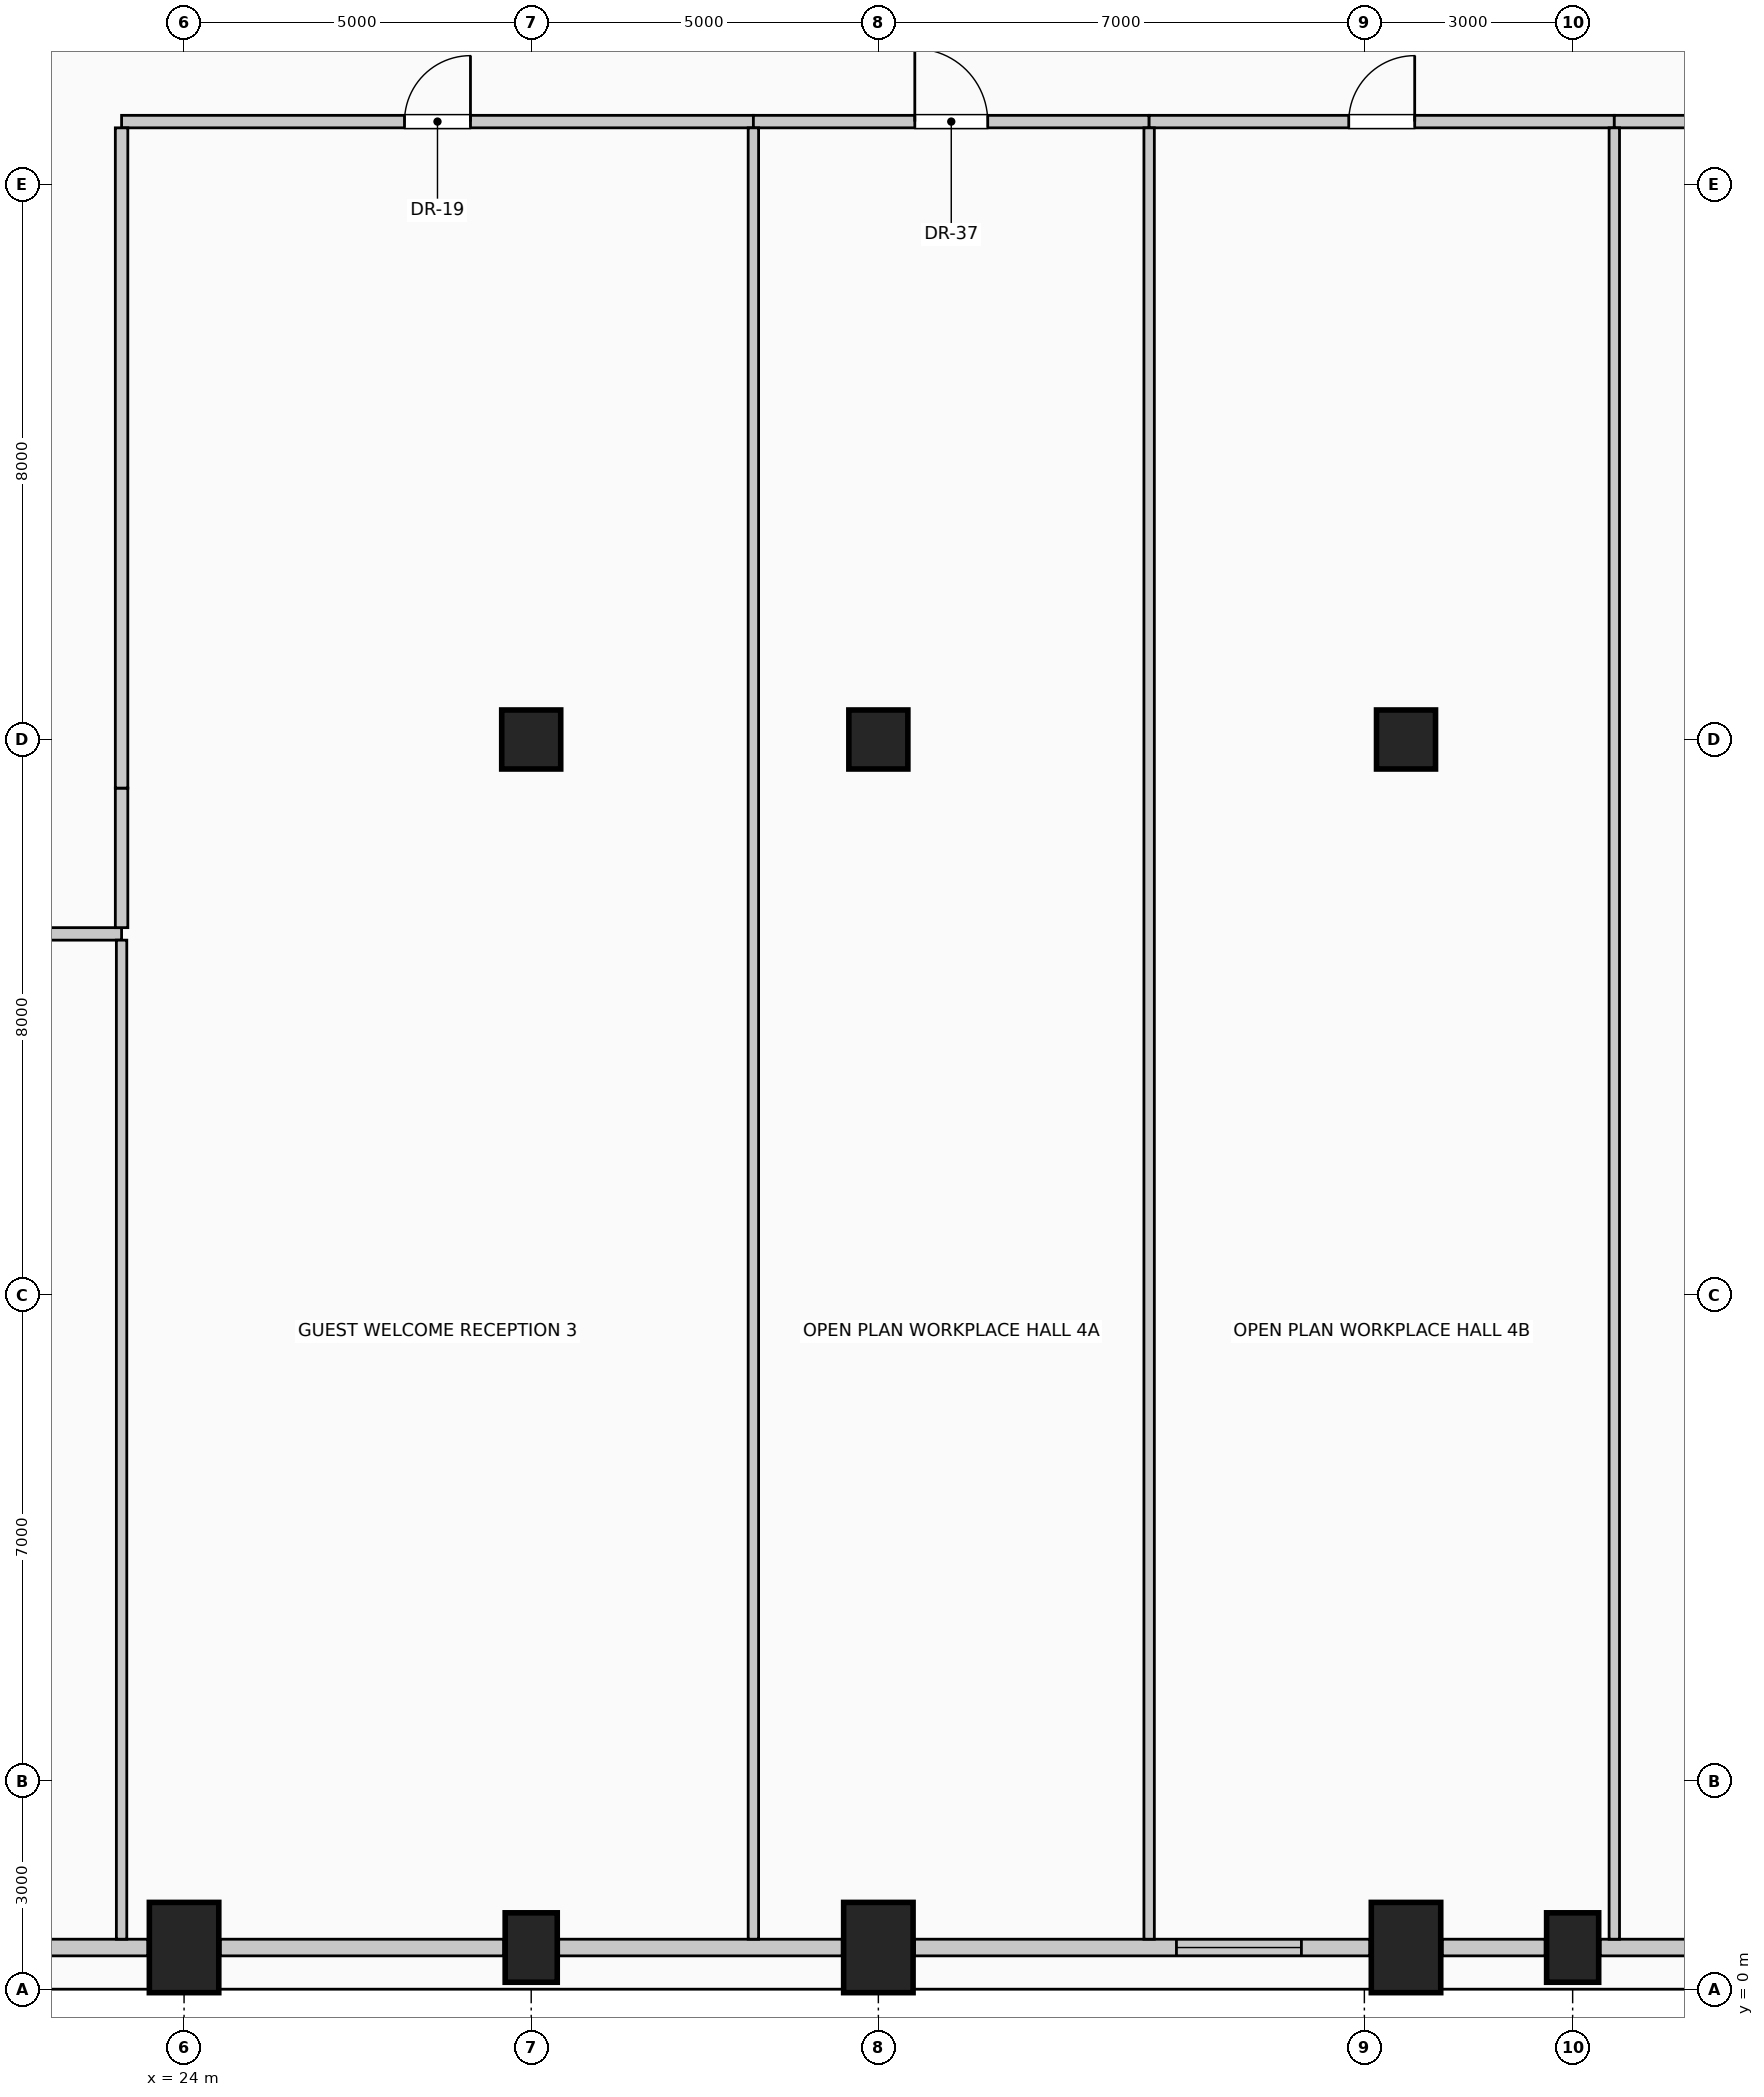
"""IFC4 building model, lengths in metres.
Left out: names, types, materials, properties, quantities, classifications, styles, units other than length and angle.
Written with IfcOpenShell. Run it as: python <this file> out.ifc"""

import sys

from ifc_helpers import new_model, si_unit, direction, frame, frame_2d, origin, origin_2d, place, context, subcontext, project, spatial, rectangle, circle, extrude, element, fill, save


model = new_model("IFC4")
c1 = context("Model", 3, precision=1e-05, world=origin(), true_north=direction((0.0, 1.0)))
c2 = subcontext(c1, "Body", "Model", "MODEL_VIEW")
j1 = project(units=[si_unit("LENGTHUNIT", "METRE"), si_unit("PLANEANGLEUNIT", "RADIAN")], contexts=[c1])
p1 = place(None, origin())
s1 = spatial("IfcSite", under=j1, at=p1, CompositionType="ELEMENT")
p2 = place(p1, origin())
s2 = spatial("IfcBuilding", under=s1, at=p2, CompositionType="ELEMENT")
p3 = place(p2, frame((0.0, 0.0, 230.6)))
s3 = spatial("IfcBuildingStorey", under=s2, at=p3, CompositionType="ELEMENT", Elevation=230.6)
p4 = place(p3, frame((24.0, 0.6, 0.0), z_axis=(0.0, 0.0, 1.0), x_axis=(1.0, 0.0, 0.0)))
e1 = element("IfcColumn", 1, at=p4, inside=s3, PredefinedType="COLUMN", context=c2, shape_type="SweptSolid", body=[
    extrude(rectangle(XDim=1.0, YDim=1.3, at=origin_2d()), origin(), (0.0, 0.0, 1.0), 4.0),
])
p5 = place(p3, frame((29.0, 0.6, 0.0), z_axis=(0.0, 0.0, 1.0), x_axis=(1.0, 0.0, 0.0)))
e2 = element("IfcColumn", 2, at=p5, inside=s3, PredefinedType="COLUMN", context=c2, shape_type="SweptSolid", body=[
    extrude(rectangle(XDim=0.75, YDim=1.0, at=origin_2d()), origin(), (0.0, 0.0, 1.0), 4.0),
])
for number, where, z_axis, x_axis in (
    (3, (34.0, 0.6, 0.0), (0.0, 0.0, 1.0), (1.0, 0.0, 0.0)),
    (4, (41.6, 0.6, 0.0), (0.0, 0.0, 1.0), (1.0, 0.0, 0.0)),
):
    element("IfcColumn", number, at=place(p3, frame(where, z_axis=z_axis, x_axis=x_axis)), inside=s3, PredefinedType="COLUMN", context=c2, shape_type="SweptSolid", body=[
        extrude(rectangle(XDim=1.0, YDim=1.3, at=origin_2d()), origin(), (0.0, 0.0, 1.0), 4.0),
    ])
p6 = place(p3, frame((44.0, 0.6, 0.0), z_axis=(0.0, 0.0, 1.0), x_axis=(1.0, 0.0, 0.0)))
e5 = element("IfcColumn", 5, at=p6, inside=s3, PredefinedType="COLUMN", context=c2, shape_type="SweptSolid", body=[
    extrude(rectangle(XDim=0.75, YDim=1.0, at=origin_2d()), origin(), (0.0, 0.0, 1.0), 4.0),
])
for number, where, z_axis, x_axis in (
    (6, (29.0, 18.0, 0.0), (0.0, 0.0, 1.0), (1.0, 0.0, 0.0)),
    (7, (41.6, 18.0, 0.0), (0.0, 0.0, 1.0), (1.0, 0.0, 0.0)),
    (8, (34.0, 18.0, 0.0), (0.0, 0.0, 1.0), (1.0, 0.0, 0.0)),
):
    element("IfcColumn", number, at=place(p3, frame(where, z_axis=z_axis, x_axis=x_axis)), inside=s3, PredefinedType="COLUMN", context=c2, shape_type="SweptSolid", body=[
        extrude(circle(Radius=0.425, at=origin_2d()), origin(), (0.0, 0.0, 1.0), 4.0),
    ])
p7 = place(p3, frame((23.48, 0.6, 0.0), z_axis=(0.0, 0.0, 1.0), x_axis=(-1.0, 0.0, 0.0)))
e9 = element("IfcWall", 9, at=p7, inside=s3, PredefinedType="SOLIDWALL", context=c2, shape_type="SweptSolid", body=[
    extrude(rectangle(XDim=6.56, YDim=0.24, at=frame_2d((3.28, 0.0))), origin(), (0.0, 0.0, 1.0), 3.0),
])
p8 = place(p7, frame((3.773, 0.0, 0.42)))
e10 = element("IfcOpeningElement", 10, at=p8, cuts=e9, PredefinedType="OPENING", context=c2, shape_type="SweptSolid", body=[
    extrude(rectangle(XDim=1.8, YDim=2.2, at=frame_2d((0.9, 1.1))), frame((0.0, 0.13, 0.0), z_axis=(0.0, -1.0, 0.0), x_axis=(1.0, 0.0, 0.0)), (0.0, 0.0, 1.0), 0.26),
])
for number, where, z_axis, x_axis in (
    (11, (28.605, 0.6, 0.0), (0.0, 0.0, 1.0), (-1.0, 0.0, 0.0)),
    (12, (33.48, 0.6, 0.0), (0.0, 0.0, 1.0), (-1.0, 0.0, 0.0)),
):
    element("IfcWall", number, at=place(p3, frame(where, z_axis=z_axis, x_axis=x_axis)), inside=s3, PredefinedType="SOLIDWALL", context=c2, shape_type="SweptSolid", body=[
        extrude(rectangle(XDim=4.085, YDim=0.24, at=frame_2d((2.042, 0.0))), origin(), (0.0, 0.0, 1.0), 3.0),
    ])
p9 = place(p3, frame((41.08, 0.6, 0.0), z_axis=(0.0, 0.0, 1.0), x_axis=(-1.0, 0.0, 0.0)))
e13 = element("IfcWall", 13, at=p9, inside=s3, PredefinedType="SOLIDWALL", context=c2, shape_type="SweptSolid", body=[
    extrude(rectangle(XDim=6.56, YDim=0.24, at=frame_2d((3.28, 0.0))), origin(), (0.0, 0.0, 1.0), 3.0),
])
p10 = place(p9, frame((0.987, 0.0, 0.42)))
e14 = element("IfcOpeningElement", 14, at=p10, cuts=e13, PredefinedType="OPENING", context=c2, shape_type="SweptSolid", body=[
    extrude(rectangle(XDim=1.8, YDim=2.2, at=frame_2d((0.9, 1.1))), frame((0.0, 0.13, 0.0), z_axis=(0.0, -1.0, 0.0), x_axis=(1.0, 0.0, 0.0)), (0.0, 0.0, 1.0), 0.26),
])
p11 = place(p3, frame((43.605, 0.6, 0.0), z_axis=(0.0, 0.0, 1.0), x_axis=(-1.0, 0.0, 0.0)))
e15 = element("IfcWall", 15, at=p11, inside=s3, PredefinedType="SOLIDWALL", context=c2, shape_type="SweptSolid", body=[
    extrude(rectangle(XDim=1.485, YDim=0.24, at=frame_2d((0.742, 0.0))), origin(), (0.0, 0.0, 1.0), 3.0),
])
p12 = place(p3, frame((49.105, 0.6, 0.0), z_axis=(0.0, 0.0, 1.0), x_axis=(-1.0, 0.0, 0.0)))
e16 = element("IfcWall", 16, at=p12, inside=s3, PredefinedType="SOLIDWALL", context=c2, shape_type="SweptSolid", body=[
    extrude(rectangle(XDim=4.71, YDim=0.24, at=frame_2d((2.355, 0.0))), origin(), (0.0, 0.0, 1.0), 3.0),
])
p13 = place(p3, frame((8.5, 15.2, 0.0), z_axis=(0.0, 0.0, 1.0), x_axis=(1.0, 0.0, 0.0)))
e17 = element("IfcWall", 17, at=p13, inside=s3, PredefinedType="PARTITIONING", context=c2, shape_type="SweptSolid", body=[
    extrude(rectangle(XDim=14.6, YDim=0.18, at=frame_2d((7.3, 0.0))), origin(), (0.0, 0.0, 1.0), 3.75),
])
p14 = place(p13, frame((6.775, 0.0, 0.0)))
e18 = element("IfcOpeningElement", 18, at=p14, cuts=e17, PredefinedType="OPENING", context=c2, shape_type="SweptSolid", body=[
    extrude(rectangle(XDim=1.05, YDim=2.15, at=frame_2d((0.525, 1.075))), frame((0.0, 0.1, 0.0), z_axis=(0.0, -1.0, 0.0), x_axis=(1.0, 0.0, 0.0)), (0.0, 0.0, 1.0), 0.2),
])
p15 = place(p3, frame((23.1, 26.9, 0.0), z_axis=(0.0, 0.0, 1.0), x_axis=(1.0, 0.0, 0.0)))
e19 = element("IfcWall", 19, at=p15, inside=s3, PredefinedType="PARTITIONING", context=c2, shape_type="SweptSolid", body=[
    extrude(rectangle(XDim=9.1, YDim=0.18, at=frame_2d((4.55, 0.0))), origin(), (0.0, 0.0, 1.0), 3.75),
])
p16 = place(p15, frame((4.075, 0.0, 0.0)))
e20 = element("IfcOpeningElement", 20, at=p16, cuts=e19, PredefinedType="OPENING", context=c2, shape_type="SweptSolid", body=[
    extrude(rectangle(XDim=0.95, YDim=2.15, at=frame_2d((0.475, 1.075))), frame((0.0, 0.1, 0.0), z_axis=(0.0, -1.0, 0.0), x_axis=(1.0, 0.0, 0.0)), (0.0, 0.0, 1.0), 0.2),
])
p17 = place(p3, frame((32.2, 26.9, 0.0), z_axis=(0.0, 0.0, 1.0), x_axis=(1.0, 0.0, 0.0)))
e21 = element("IfcWall", 21, at=p17, inside=s3, PredefinedType="PARTITIONING", context=c2, shape_type="SweptSolid", body=[
    extrude(rectangle(XDim=5.7, YDim=0.18, at=frame_2d((2.85, 0.0))), origin(), (0.0, 0.0, 1.0), 3.75),
])
p18 = place(p17, frame((2.325, 0.0, 0.0)))
e22 = element("IfcOpeningElement", 22, at=p18, cuts=e21, PredefinedType="OPENING", context=c2, shape_type="SweptSolid", body=[
    extrude(rectangle(XDim=1.05, YDim=2.15, at=frame_2d((0.525, 1.075))), frame((0.0, 0.1, 0.0), z_axis=(0.0, -1.0, 0.0), x_axis=(1.0, 0.0, 0.0)), (0.0, 0.0, 1.0), 0.2),
])
p19 = place(p3, frame((37.9, 26.9, 0.0), z_axis=(0.0, 0.0, 1.0), x_axis=(1.0, 0.0, 0.0)))
e23 = element("IfcWall", 23, at=p19, inside=s3, PredefinedType="PARTITIONING", context=c2, shape_type="SweptSolid", body=[
    extrude(rectangle(XDim=6.7, YDim=0.18, at=frame_2d((3.35, 0.0))), origin(), (0.0, 0.0, 1.0), 3.75),
])
p20 = place(p19, frame((2.875, 0.0, 0.0)))
e24 = element("IfcOpeningElement", 24, at=p20, cuts=e23, PredefinedType="OPENING", context=c2, shape_type="SweptSolid", body=[
    extrude(rectangle(XDim=0.95, YDim=2.15, at=frame_2d((0.475, 1.075))), frame((0.0, 0.1, 0.0), z_axis=(0.0, -1.0, 0.0), x_axis=(1.0, 0.0, 0.0)), (0.0, 0.0, 1.0), 0.2),
])
p21 = place(p3, frame((44.6, 26.9, 0.0), z_axis=(0.0, 0.0, 1.0), x_axis=(1.0, 0.0, 0.0)))
e25 = element("IfcWall", 25, at=p21, inside=s3, PredefinedType="PARTITIONING", context=c2, shape_type="SweptSolid", body=[
    extrude(rectangle(XDim=12.68, YDim=0.18, at=frame_2d((6.34, 0.0))), origin(), (0.0, 0.0, 1.0), 3.75),
])
p22 = place(p21, frame((5.815, 0.0, 0.0)))
e26 = element("IfcOpeningElement", 26, at=p22, cuts=e25, PredefinedType="OPENING", context=c2, shape_type="SweptSolid", body=[
    extrude(rectangle(XDim=1.05, YDim=2.15, at=frame_2d((0.525, 1.075))), frame((0.0, 0.1, 0.0), z_axis=(0.0, -1.0, 0.0), x_axis=(1.0, 0.0, 0.0)), (0.0, 0.0, 1.0), 0.2),
])
p23 = place(p3, frame((23.1, 0.72, 0.0), z_axis=(0.0, 0.0, 1.0), x_axis=(0.0, 1.0, 0.0)))
e27 = element("IfcWall", 27, at=p23, inside=s3, PredefinedType="PARTITIONING", context=c2, shape_type="SweptSolid", body=[
    extrude(rectangle(XDim=14.39, YDim=0.15, at=frame_2d((7.195, 0.0))), origin(), (0.0, 0.0, 1.0), 3.75),
])
p24 = place(p3, frame((23.1, 15.29, 0.0), z_axis=(0.0, 0.0, 1.0), x_axis=(0.0, 1.0, 0.0)))
e28 = element("IfcWall", 28, at=p24, inside=s3, PredefinedType="PARTITIONING", context=c2, shape_type="SweptSolid", body=[
    extrude(rectangle(XDim=2.01, YDim=0.18, at=frame_2d((1.005, 0.0))), origin(), (0.0, 0.0, 1.0), 3.75),
])
p25 = place(p3, frame((23.1, 17.3, 0.0), z_axis=(0.0, 0.0, 1.0), x_axis=(0.0, 1.0, 0.0)))
e29 = element("IfcWall", 29, at=p25, inside=s3, PredefinedType="PARTITIONING", context=c2, shape_type="SweptSolid", body=[
    extrude(rectangle(XDim=9.51, YDim=0.18, at=frame_2d((4.755, 0.0))), origin(), (0.0, 0.0, 1.0), 3.75),
])
for number, where, z_axis, x_axis in (
    (30, (32.2, 0.72, 0.0), (0.0, 0.0, 1.0), (0.0, 1.0, 0.0)),
    (31, (37.9, 0.72, 0.0), (0.0, 0.0, 1.0), (0.0, 1.0, 0.0)),
    (32, (44.6, 0.72, 0.0), (0.0, 0.0, 1.0), (0.0, 1.0, 0.0)),
):
    element("IfcWall", number, at=place(p3, frame(where, z_axis=z_axis, x_axis=x_axis)), inside=s3, PredefinedType="PARTITIONING", context=c2, shape_type="SweptSolid", body=[
        extrude(rectangle(XDim=26.09, YDim=0.15, at=frame_2d((13.045, 0.0))), origin(), (0.0, 0.0, 1.0), 3.75),
    ])
p26 = place(p10, origin())
e33 = element("IfcWindow", 33, at=p26, inside=s3, PartitioningType="SINGLE_PANEL", PredefinedType="WINDOW", context=c2, shape_type="SweptSolid", body=[
    extrude(rectangle(XDim=1.8, YDim=2.2, at=frame_2d((0.9, 1.1))), frame((0.0, 0.03, 0.0), z_axis=(0.0, -1.0, 0.0), x_axis=(1.0, 0.0, 0.0)), (0.0, 0.0, 1.0), 0.06),
])
fill(e14, e33)
p27 = place(p16, origin())
e34 = element("IfcDoor", 34, at=p27, inside=s3, OperationType="SINGLE_SWING_RIGHT", PredefinedType="DOOR", context=c2, shape_type="SweptSolid", body=[
    extrude(rectangle(XDim=0.95, YDim=2.15, at=frame_2d((0.475, 1.075))), frame((0.0, 0.025, 0.0), z_axis=(0.0, -1.0, 0.0), x_axis=(1.0, 0.0, 0.0)), (0.0, 0.0, 1.0), 0.05),
])
fill(e20, e34)
p28 = place(p18, origin())
e35 = element("IfcDoor", 35, at=p28, inside=s3, OperationType="SINGLE_SWING_LEFT", PredefinedType="DOOR", context=c2, shape_type="SweptSolid", body=[
    extrude(rectangle(XDim=1.05, YDim=2.15, at=frame_2d((0.525, 1.075))), frame((0.0, 0.025, 0.0), z_axis=(0.0, -1.0, 0.0), x_axis=(1.0, 0.0, 0.0)), (0.0, 0.0, 1.0), 0.05),
])
fill(e22, e35)
p29 = place(p20, origin())
e36 = element("IfcDoor", 36, at=p29, inside=s3, OperationType="SINGLE_SWING_RIGHT", PredefinedType="DOOR", context=c2, shape_type="SweptSolid", body=[
    extrude(rectangle(XDim=0.95, YDim=2.15, at=frame_2d((0.475, 1.075))), frame((0.0, 0.025, 0.0), z_axis=(0.0, -1.0, 0.0), x_axis=(1.0, 0.0, 0.0)), (0.0, 0.0, 1.0), 0.05),
])
fill(e24, e36)
save(model, sys.argv[1])
